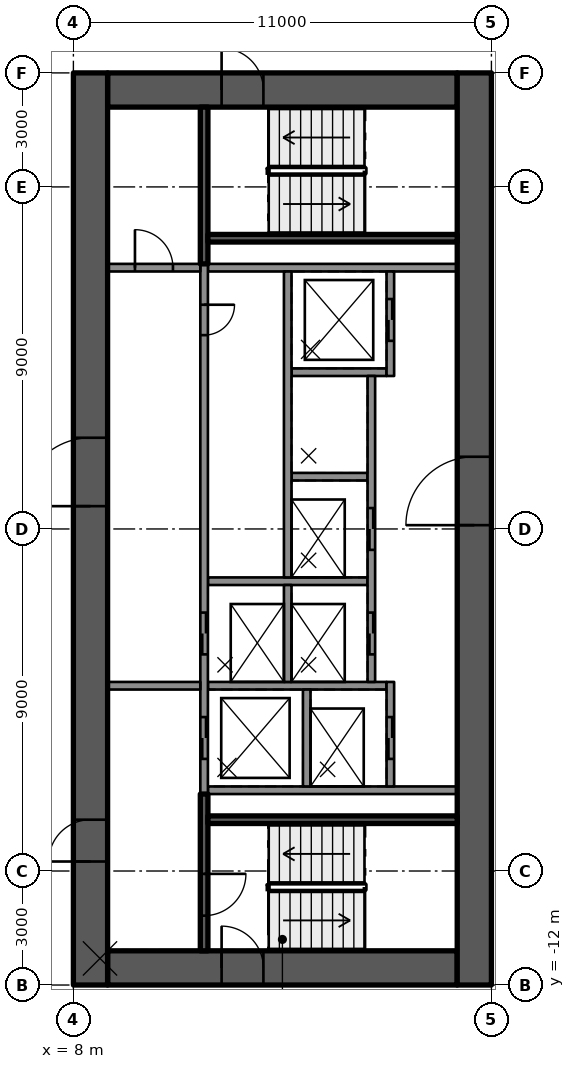
"""IFC4 building model, lengths in metres.
Left out: names, types, materials, properties, quantities, classifications, styles, units other than length and angle.
Written with IfcOpenShell. Run it as: python <this file> out.ifc"""

import sys

from ifc_helpers import new_model, si_unit, direction, frame, frame_2d, origin, place, context, subcontext, project, spatial, rectangle, extrude, element, fill, save


model = new_model("IFC4")
c1 = context("Model", 3, precision=1e-05, world=origin(), true_north=direction((0.0, 1.0)))
c2 = subcontext(c1, "Body", "Model", "MODEL_VIEW")
j1 = project(units=[si_unit("LENGTHUNIT", "METRE"), si_unit("PLANEANGLEUNIT", "RADIAN")], contexts=[c1])
p1 = place(None, origin())
s1 = spatial("IfcSite", under=j1, at=p1, CompositionType="ELEMENT")
p2 = place(p1, origin())
s2 = spatial("IfcBuilding", under=s1, at=p2, CompositionType="ELEMENT")
p3 = place(p2, frame((0.0, 0.0, 181.1)))
s3 = spatial("IfcBuildingStorey", under=s2, at=p3, CompositionType="ELEMENT", Elevation=181.1)
p4 = place(p3, frame((8.9, 11.55, 0.0), z_axis=(0.0, 0.0, 1.0), x_axis=(1.0, 0.0, 0.0)))
e1 = element("IfcWall", 1, at=p4, inside=s3, PredefinedType="SHEAR", context=c2, shape_type="SweptSolid", body=[
    extrude(rectangle(XDim=9.2, YDim=0.9, at=frame_2d((4.6, 0.0))), origin(), (0.0, 0.0, 1.0), 3.5),
])
p5 = place(p4, frame((3.0, 0.0, 0.0)))
e2 = element("IfcOpeningElement", 2, at=p5, cuts=e1, PredefinedType="OPENING", context=c2, shape_type="SweptSolid", body=[
    extrude(rectangle(XDim=1.1, YDim=2.1, at=frame_2d((0.55, 1.05))), frame((0.0, 0.46, 0.0), z_axis=(0.0, -1.0, 0.0), x_axis=(1.0, 0.0, 0.0)), (0.0, 0.0, 1.0), 0.92),
])
p6 = place(p3, frame((8.9, -11.55, 0.0), z_axis=(0.0, 0.0, 1.0), x_axis=(1.0, 0.0, 0.0)))
e3 = element("IfcWall", 3, at=p6, inside=s3, PredefinedType="SHEAR", context=c2, shape_type="SweptSolid", body=[
    extrude(rectangle(XDim=9.2, YDim=0.9, at=frame_2d((4.6, 0.0))), origin(), (0.0, 0.0, 1.0), 3.5),
])
p7 = place(p6, frame((3.0, 0.0, 0.0)))
e4 = element("IfcOpeningElement", 4, at=p7, cuts=e3, PredefinedType="OPENING", context=c2, shape_type="SweptSolid", body=[
    extrude(rectangle(XDim=1.1, YDim=2.1, at=frame_2d((0.55, 1.05))), frame((0.0, 0.46, 0.0), z_axis=(0.0, -1.0, 0.0), x_axis=(1.0, 0.0, 0.0)), (0.0, 0.0, 1.0), 0.92),
])
p8 = place(p3, frame((8.45, -12.0, 0.0), z_axis=(0.0, 0.0, 1.0), x_axis=(0.0, 1.0, 0.0)))
e5 = element("IfcWall", 5, at=p8, inside=s3, PredefinedType="SHEAR", context=c2, shape_type="SweptSolid", body=[
    extrude(rectangle(XDim=24.0, YDim=0.9, at=frame_2d((12.0, 0.0))), origin(), (0.0, 0.0, 1.0), 3.5),
])
p9 = place(p8, frame((12.6, 0.0, 0.0)))
e6 = element("IfcOpeningElement", 6, at=p9, cuts=e5, PredefinedType="OPENING", context=c2, shape_type="SweptSolid", body=[
    extrude(rectangle(XDim=1.8, YDim=2.1, at=frame_2d((0.9, 1.05))), frame((0.0, 0.46, 0.0), z_axis=(0.0, -1.0, 0.0), x_axis=(1.0, 0.0, 0.0)), (0.0, 0.0, 1.0), 0.92),
])
p10 = place(p8, frame((3.25, 0.0, 0.0)))
e7 = element("IfcOpeningElement", 7, at=p10, cuts=e5, PredefinedType="OPENING", context=c2, shape_type="SweptSolid", body=[
    extrude(rectangle(XDim=1.1, YDim=2.1, at=frame_2d((0.55, 1.05))), frame((0.0, 0.46, 0.0), z_axis=(0.0, -1.0, 0.0), x_axis=(1.0, 0.0, 0.0)), (0.0, 0.0, 1.0), 0.92),
])
p11 = place(p3, frame((18.55, -12.0, 0.0), z_axis=(0.0, 0.0, 1.0), x_axis=(0.0, 1.0, 0.0)))
e8 = element("IfcWall", 8, at=p11, inside=s3, PredefinedType="SHEAR", context=c2, shape_type="SweptSolid", body=[
    extrude(rectangle(XDim=24.0, YDim=0.9, at=frame_2d((12.0, 0.0))), origin(), (0.0, 0.0, 1.0), 3.5),
])
p12 = place(p11, frame((12.1, 0.0, 0.0)))
e9 = element("IfcOpeningElement", 9, at=p12, cuts=e8, PredefinedType="OPENING", context=c2, shape_type="SweptSolid", body=[
    extrude(rectangle(XDim=1.8, YDim=2.1, at=frame_2d((0.9, 1.05))), frame((0.0, 0.46, 0.0), z_axis=(0.0, -1.0, 0.0), x_axis=(1.0, 0.0, 0.0)), (0.0, 0.0, 1.0), 0.92),
])
for number, where, z_axis, x_axis in (
    (10, (11.54, -6.875, 0.0), (0.0, 0.0, 1.0), (1.0, 0.0, 0.0)),
    (11, (11.54, 6.875, 0.0), (0.0, 0.0, 1.0), (1.0, 0.0, 0.0)),
):
    element("IfcWall", number, at=place(p3, frame(where, z_axis=z_axis, x_axis=x_axis)), inside=s3, PredefinedType="SOLIDWALL", context=c2, shape_type="SweptSolid", body=[
        extrude(rectangle(XDim=6.56, YDim=0.2, at=frame_2d((3.28, 0.0))), origin(), (0.0, 0.0, 1.0), 3.08),
    ])
p13 = place(p3, frame((13.74, 4.125, 0.0), z_axis=(0.0, 0.0, 1.0), x_axis=(1.0, 0.0, 0.0)))
e12 = element("IfcWall", 12, at=p13, inside=s3, PredefinedType="SOLIDWALL", context=c2, shape_type="SweptSolid", body=[
    extrude(rectangle(XDim=2.5, YDim=0.2, at=frame_2d((1.25, 0.0))), origin(), (0.0, 0.0, 1.0), 3.08),
])
p14 = place(p3, frame((13.74, 1.375, 0.0), z_axis=(0.0, 0.0, 1.0), x_axis=(1.0, 0.0, 0.0)))
e13 = element("IfcWall", 13, at=p14, inside=s3, PredefinedType="SOLIDWALL", context=c2, shape_type="SweptSolid", body=[
    extrude(rectangle(XDim=2.0, YDim=0.2, at=frame_2d((1.0, 0.0))), origin(), (0.0, 0.0, 1.0), 3.08),
])
p15 = place(p3, frame((11.54, -1.375, 0.0), z_axis=(0.0, 0.0, 1.0), x_axis=(1.0, 0.0, 0.0)))
e14 = element("IfcWall", 14, at=p15, inside=s3, PredefinedType="SOLIDWALL", context=c2, shape_type="SweptSolid", body=[
    extrude(rectangle(XDim=4.2, YDim=0.2, at=frame_2d((2.1, 0.0))), origin(), (0.0, 0.0, 1.0), 3.08),
])
p16 = place(p3, frame((11.54, -4.125, 0.0), z_axis=(0.0, 0.0, 1.0), x_axis=(1.0, 0.0, 0.0)))
e15 = element("IfcWall", 15, at=p16, inside=s3, PredefinedType="SOLIDWALL", context=c2, shape_type="SweptSolid", body=[
    extrude(rectangle(XDim=4.7, YDim=0.2, at=frame_2d((2.35, 0.0))), origin(), (0.0, 0.0, 1.0), 3.08),
])
p17 = place(p3, frame((11.44, 6.975, 0.0), z_axis=(0.0, 0.0, 1.0), x_axis=(0.0, -1.0, 0.0)))
e16 = element("IfcWall", 16, at=p17, inside=s3, PredefinedType="SOLIDWALL", context=c2, shape_type="SweptSolid", body=[
    extrude(rectangle(XDim=13.95, YDim=0.2, at=frame_2d((6.975, 0.0))), origin(), (0.0, 0.0, 1.0), 3.08),
])
p18 = place(p17, frame((9.175, 0.0, 0.0)))
e17 = element("IfcOpeningElement", 17, at=p18, cuts=e16, PredefinedType="OPENING", context=c2, shape_type="SweptSolid", body=[
    extrude(rectangle(XDim=1.1, YDim=2.1, at=frame_2d((0.55, 1.05))), frame((0.0, 0.11, 0.0), z_axis=(0.0, -1.0, 0.0), x_axis=(1.0, 0.0, 0.0)), (0.0, 0.0, 1.0), 0.22),
])
p19 = place(p17, frame((11.925, 0.0, 0.0)))
e18 = element("IfcOpeningElement", 18, at=p19, cuts=e16, PredefinedType="OPENING", context=c2, shape_type="SweptSolid", body=[
    extrude(rectangle(XDim=1.1, YDim=2.1, at=frame_2d((0.55, 1.05))), frame((0.0, 0.11, 0.0), z_axis=(0.0, -1.0, 0.0), x_axis=(1.0, 0.0, 0.0)), (0.0, 0.0, 1.0), 0.22),
])
p20 = place(p17, frame((1.075, 0.0, 0.0)))
e19 = element("IfcOpeningElement", 19, at=p20, cuts=e16, PredefinedType="OPENING", context=c2, shape_type="SweptSolid", body=[
    extrude(rectangle(XDim=0.8, YDim=2.1, at=frame_2d((0.4, 1.05))), frame((0.0, 0.11, 0.0), z_axis=(0.0, -1.0, 0.0), x_axis=(1.0, 0.0, 0.0)), (0.0, 0.0, 1.0), 0.22),
])
p21 = place(p3, frame((13.64, 6.775, 0.0), z_axis=(0.0, 0.0, 1.0), x_axis=(0.0, -1.0, 0.0)))
e20 = element("IfcWall", 20, at=p21, inside=s3, PredefinedType="SOLIDWALL", context=c2, shape_type="SweptSolid", body=[
    extrude(rectangle(XDim=8.05, YDim=0.2, at=frame_2d((4.025, 0.0))), origin(), (0.0, 0.0, 1.0), 3.08),
])
for number, where, z_axis, x_axis in (
    (21, (13.64, -1.475, 0.0), (0.0, 0.0, 1.0), (0.0, -1.0, 0.0)),
    (22, (14.14, -4.225, 0.0), (0.0, 0.0, 1.0), (0.0, -1.0, 0.0)),
):
    element("IfcWall", number, at=place(p3, frame(where, z_axis=z_axis, x_axis=x_axis)), inside=s3, PredefinedType="SOLIDWALL", context=c2, shape_type="SweptSolid", body=[
        extrude(rectangle(XDim=2.55, YDim=0.2, at=frame_2d((1.275, 0.0))), origin(), (0.0, 0.0, 1.0), 3.08),
    ])
p22 = place(p3, frame((16.34, 6.775, 0.0), z_axis=(0.0, 0.0, 1.0), x_axis=(0.0, -1.0, 0.0)))
e23 = element("IfcWall", 23, at=p22, inside=s3, PredefinedType="SOLIDWALL", context=c2, shape_type="SweptSolid", body=[
    extrude(rectangle(XDim=2.75, YDim=0.2, at=frame_2d((1.375, 0.0))), origin(), (0.0, 0.0, 1.0), 3.08),
])
p23 = place(p22, frame((0.725, 0.0, 0.0)))
e24 = element("IfcOpeningElement", 24, at=p23, cuts=e23, PredefinedType="OPENING", context=c2, shape_type="SweptSolid", body=[
    extrude(rectangle(XDim=1.1, YDim=2.1, at=frame_2d((0.55, 1.05))), frame((0.0, 0.11, 0.0), z_axis=(0.0, -1.0, 0.0), x_axis=(1.0, 0.0, 0.0)), (0.0, 0.0, 1.0), 0.22),
])
p24 = place(p3, frame((15.84, 4.025, 0.0), z_axis=(0.0, 0.0, 1.0), x_axis=(0.0, -1.0, 0.0)))
e25 = element("IfcWall", 25, at=p24, inside=s3, PredefinedType="SOLIDWALL", context=c2, shape_type="SweptSolid", body=[
    extrude(rectangle(XDim=8.05, YDim=0.2, at=frame_2d((4.025, 0.0))), origin(), (0.0, 0.0, 1.0), 3.08),
])
p25 = place(p24, frame((3.475, 0.0, 0.0)))
e26 = element("IfcOpeningElement", 26, at=p25, cuts=e25, PredefinedType="OPENING", context=c2, shape_type="SweptSolid", body=[
    extrude(rectangle(XDim=1.1, YDim=2.1, at=frame_2d((0.55, 1.05))), frame((0.0, 0.11, 0.0), z_axis=(0.0, -1.0, 0.0), x_axis=(1.0, 0.0, 0.0)), (0.0, 0.0, 1.0), 0.22),
])
p26 = place(p24, frame((6.225, 0.0, 0.0)))
e27 = element("IfcOpeningElement", 27, at=p26, cuts=e25, PredefinedType="OPENING", context=c2, shape_type="SweptSolid", body=[
    extrude(rectangle(XDim=1.1, YDim=2.1, at=frame_2d((0.55, 1.05))), frame((0.0, 0.11, 0.0), z_axis=(0.0, -1.0, 0.0), x_axis=(1.0, 0.0, 0.0)), (0.0, 0.0, 1.0), 0.22),
])
p27 = place(p3, frame((16.34, -4.025, 0.0), z_axis=(0.0, 0.0, 1.0), x_axis=(0.0, -1.0, 0.0)))
e28 = element("IfcWall", 28, at=p27, inside=s3, PredefinedType="SOLIDWALL", context=c2, shape_type="SweptSolid", body=[
    extrude(rectangle(XDim=2.75, YDim=0.2, at=frame_2d((1.375, 0.0))), origin(), (0.0, 0.0, 1.0), 3.08),
])
p28 = place(p27, frame((0.925, 0.0, 0.0)))
e29 = element("IfcOpeningElement", 29, at=p28, cuts=e28, PredefinedType="OPENING", context=c2, shape_type="SweptSolid", body=[
    extrude(rectangle(XDim=1.1, YDim=2.1, at=frame_2d((0.55, 1.05))), frame((0.0, 0.11, 0.0), z_axis=(0.0, -1.0, 0.0), x_axis=(1.0, 0.0, 0.0)), (0.0, 0.0, 1.0), 0.22),
])
p29 = place(p3, frame((11.44, -6.975, 0.0), z_axis=(0.0, 0.0, 1.0), x_axis=(0.0, -1.0, 0.0)))
e30 = element("IfcWall", 30, at=p29, inside=s3, PredefinedType="SOLIDWALL", context=c2, shape_type="SweptSolid", body=[
    extrude(rectangle(XDim=4.125, YDim=0.2, at=frame_2d((2.062, 0.0))), origin(), (0.0, 0.0, 1.0), 3.08),
])
p30 = place(p29, frame((2.1, 0.0, 0.0)))
e31 = element("IfcOpeningElement", 31, at=p30, cuts=e30, PredefinedType="OPENING", context=c2, shape_type="SweptSolid", body=[
    extrude(rectangle(XDim=1.1, YDim=2.1, at=frame_2d((0.55, 1.05))), frame((0.0, 0.11, 0.0), z_axis=(0.0, -1.0, 0.0), x_axis=(1.0, 0.0, 0.0)), (0.0, 0.0, 1.0), 0.22),
])
p31 = place(p3, frame((11.54, -7.65, 0.0), z_axis=(0.0, 0.0, 1.0), x_axis=(1.0, 0.0, 0.0)))
e32 = element("IfcWall", 32, at=p31, inside=s3, PredefinedType="SOLIDWALL", context=c2, shape_type="SweptSolid", body=[
    extrude(rectangle(XDim=6.56, YDim=0.2, at=frame_2d((3.28, 0.0))), origin(), (0.0, 0.0, 1.0), 3.08),
])
p32 = place(p3, frame((11.44, 11.1, 0.0), z_axis=(0.0, 0.0, 1.0), x_axis=(0.0, -1.0, 0.0)))
e33 = element("IfcWall", 33, at=p32, inside=s3, PredefinedType="SOLIDWALL", context=c2, shape_type="SweptSolid", body=[
    extrude(rectangle(XDim=4.125, YDim=0.2, at=frame_2d((2.062, 0.0))), origin(), (0.0, 0.0, 1.0), 3.08),
])
p33 = place(p3, frame((11.54, 7.65, 0.0), z_axis=(0.0, 0.0, 1.0), x_axis=(1.0, 0.0, 0.0)))
e34 = element("IfcWall", 34, at=p33, inside=s3, PredefinedType="SOLIDWALL", context=c2, shape_type="SweptSolid", body=[
    extrude(rectangle(XDim=6.56, YDim=0.2, at=frame_2d((3.28, 0.0))), origin(), (0.0, 0.0, 1.0), 3.08),
])
p34 = place(p3, frame((8.9, -4.125, 0.0), z_axis=(0.0, 0.0, 1.0), x_axis=(1.0, 0.0, 0.0)))
e35 = element("IfcWall", 35, at=p34, inside=s3, PredefinedType="PARTITIONING", context=c2, shape_type="SweptSolid", body=[
    extrude(rectangle(XDim=2.44, YDim=0.2, at=frame_2d((1.22, 0.0))), origin(), (0.0, 0.0, 1.0), 3.08),
])
p35 = place(p3, frame((8.9, 6.875, 0.0), z_axis=(0.0, 0.0, 1.0), x_axis=(1.0, 0.0, 0.0)))
e36 = element("IfcWall", 36, at=p35, inside=s3, PredefinedType="PARTITIONING", context=c2, shape_type="SweptSolid", body=[
    extrude(rectangle(XDim=2.44, YDim=0.2, at=frame_2d((1.22, 0.0))), origin(), (0.0, 0.0, 1.0), 3.08),
])
p36 = place(p35, frame((0.72, 0.0, 0.0)))
e37 = element("IfcOpeningElement", 37, at=p36, cuts=e36, PredefinedType="OPENING", context=c2, shape_type="SweptSolid", body=[
    extrude(rectangle(XDim=1.0, YDim=2.1, at=frame_2d((0.5, 1.05))), frame((0.0, 0.11, 0.0), z_axis=(0.0, -1.0, 0.0), x_axis=(1.0, 0.0, 0.0)), (0.0, 0.0, 1.0), 0.22),
])
p37 = place(p23, origin())
e38 = element("IfcDoor", 38, at=p37, inside=s3, OperationType="DOUBLE_DOOR_SLIDING", PredefinedType="DOOR", context=c2, shape_type="SweptSolid", body=[
    extrude(rectangle(XDim=1.1, YDim=2.1, at=frame_2d((0.55, 1.05))), frame((0.0, 0.025, 0.0), z_axis=(0.0, -1.0, 0.0), x_axis=(1.0, 0.0, 0.0)), (0.0, 0.0, 1.0), 0.05),
])
fill(e24, e38)
p38 = place(p25, origin())
e39 = element("IfcDoor", 39, at=p38, inside=s3, OperationType="DOUBLE_DOOR_SLIDING", PredefinedType="DOOR", context=c2, shape_type="SweptSolid", body=[
    extrude(rectangle(XDim=1.1, YDim=2.1, at=frame_2d((0.55, 1.05))), frame((0.0, 0.025, 0.0), z_axis=(0.0, -1.0, 0.0), x_axis=(1.0, 0.0, 0.0)), (0.0, 0.0, 1.0), 0.05),
])
fill(e26, e39)
p39 = place(p18, origin())
e40 = element("IfcDoor", 40, at=p39, inside=s3, OperationType="DOUBLE_DOOR_SLIDING", PredefinedType="DOOR", context=c2, shape_type="SweptSolid", body=[
    extrude(rectangle(XDim=1.1, YDim=2.1, at=frame_2d((0.55, 1.05))), frame((0.0, 0.025, 0.0), z_axis=(0.0, -1.0, 0.0), x_axis=(1.0, 0.0, 0.0)), (0.0, 0.0, 1.0), 0.05),
])
fill(e17, e40)
p40 = place(p26, origin())
e41 = element("IfcDoor", 41, at=p40, inside=s3, OperationType="DOUBLE_DOOR_SLIDING", PredefinedType="DOOR", context=c2, shape_type="SweptSolid", body=[
    extrude(rectangle(XDim=1.1, YDim=2.1, at=frame_2d((0.55, 1.05))), frame((0.0, 0.025, 0.0), z_axis=(0.0, -1.0, 0.0), x_axis=(1.0, 0.0, 0.0)), (0.0, 0.0, 1.0), 0.05),
])
fill(e27, e41)
p41 = place(p19, origin())
e42 = element("IfcDoor", 42, at=p41, inside=s3, OperationType="DOUBLE_DOOR_SLIDING", PredefinedType="DOOR", context=c2, shape_type="SweptSolid", body=[
    extrude(rectangle(XDim=1.1, YDim=2.1, at=frame_2d((0.55, 1.05))), frame((0.0, 0.025, 0.0), z_axis=(0.0, -1.0, 0.0), x_axis=(1.0, 0.0, 0.0)), (0.0, 0.0, 1.0), 0.05),
])
fill(e18, e42)
p42 = place(p28, origin())
e43 = element("IfcDoor", 43, at=p42, inside=s3, OperationType="DOUBLE_DOOR_SLIDING", PredefinedType="DOOR", context=c2, shape_type="SweptSolid", body=[
    extrude(rectangle(XDim=1.1, YDim=2.1, at=frame_2d((0.55, 1.05))), frame((0.0, 0.025, 0.0), z_axis=(0.0, -1.0, 0.0), x_axis=(1.0, 0.0, 0.0)), (0.0, 0.0, 1.0), 0.05),
])
fill(e29, e43)
p43 = place(p20, origin())
e44 = element("IfcDoor", 44, at=p43, inside=s3, OperationType="SINGLE_SWING_LEFT", PredefinedType="DOOR", context=c2, shape_type="SweptSolid", body=[
    extrude(rectangle(XDim=0.8, YDim=2.1, at=frame_2d((0.4, 1.05))), frame((0.0, 0.025, 0.0), z_axis=(0.0, -1.0, 0.0), x_axis=(1.0, 0.0, 0.0)), (0.0, 0.0, 1.0), 0.05),
])
fill(e19, e44)
p44 = place(p9, origin())
e45 = element("IfcDoor", 45, at=p44, inside=s3, OperationType="SINGLE_SWING_RIGHT", PredefinedType="DOOR", context=c2, shape_type="SweptSolid", body=[
    extrude(rectangle(XDim=1.8, YDim=2.1, at=frame_2d((0.9, 1.05))), frame((0.0, 0.025, 0.0), z_axis=(0.0, -1.0, 0.0), x_axis=(1.0, 0.0, 0.0)), (0.0, 0.0, 1.0), 0.05),
])
fill(e6, e45)
p45 = place(p12, origin())
e46 = element("IfcDoor", 46, at=p45, inside=s3, OperationType="SINGLE_SWING_RIGHT", PredefinedType="DOOR", context=c2, shape_type="SweptSolid", body=[
    extrude(rectangle(XDim=1.8, YDim=2.1, at=frame_2d((0.9, 1.05))), frame((0.0, 0.025, 0.0), z_axis=(0.0, -1.0, 0.0), x_axis=(1.0, 0.0, 0.0)), (0.0, 0.0, 1.0), 0.05),
])
fill(e9, e46)
p46 = place(p10, origin())
e47 = element("IfcDoor", 47, at=p46, inside=s3, OperationType="SINGLE_SWING_LEFT", PredefinedType="DOOR", context=c2, shape_type="SweptSolid", body=[
    extrude(rectangle(XDim=1.1, YDim=2.1, at=frame_2d((0.55, 1.05))), frame((0.0, 0.025, 0.0), z_axis=(0.0, -1.0, 0.0), x_axis=(1.0, 0.0, 0.0)), (0.0, 0.0, 1.0), 0.05),
])
fill(e7, e47)
p47 = place(p7, origin())
e48 = element("IfcDoor", 48, at=p47, inside=s3, OperationType="SINGLE_SWING_LEFT", PredefinedType="DOOR", context=c2, shape_type="SweptSolid", body=[
    extrude(rectangle(XDim=1.1, YDim=2.1, at=frame_2d((0.55, 1.05))), frame((0.0, 0.025, 0.0), z_axis=(0.0, -1.0, 0.0), x_axis=(1.0, 0.0, 0.0)), (0.0, 0.0, 1.0), 0.05),
])
fill(e4, e48)
p48 = place(p5, origin())
e49 = element("IfcDoor", 49, at=p48, inside=s3, OperationType="SINGLE_SWING_LEFT", PredefinedType="DOOR", context=c2, shape_type="SweptSolid", body=[
    extrude(rectangle(XDim=1.1, YDim=2.1, at=frame_2d((0.55, 1.05))), frame((0.0, 0.025, 0.0), z_axis=(0.0, -1.0, 0.0), x_axis=(1.0, 0.0, 0.0)), (0.0, 0.0, 1.0), 0.05),
])
fill(e2, e49)
p49 = place(p30, origin())
e50 = element("IfcDoor", 50, at=p49, inside=s3, OperationType="SINGLE_SWING_RIGHT", PredefinedType="DOOR", context=c2, shape_type="SweptSolid", body=[
    extrude(rectangle(XDim=1.1, YDim=2.1, at=frame_2d((0.55, 1.05))), frame((0.0, 0.025, 0.0), z_axis=(0.0, -1.0, 0.0), x_axis=(1.0, 0.0, 0.0)), (0.0, 0.0, 1.0), 0.05),
])
fill(e31, e50)
p50 = place(p36, origin())
e51 = element("IfcDoor", 51, at=p50, inside=s3, OperationType="SINGLE_SWING_RIGHT", PredefinedType="DOOR", context=c2, shape_type="SweptSolid", body=[
    extrude(rectangle(XDim=1.0, YDim=2.1, at=frame_2d((0.5, 1.05))), frame((0.0, 0.025, 0.0), z_axis=(0.0, -1.0, 0.0), x_axis=(1.0, 0.0, 0.0)), (0.0, 0.0, 1.0), 0.05),
])
fill(e37, e51)
save(model, sys.argv[1])
